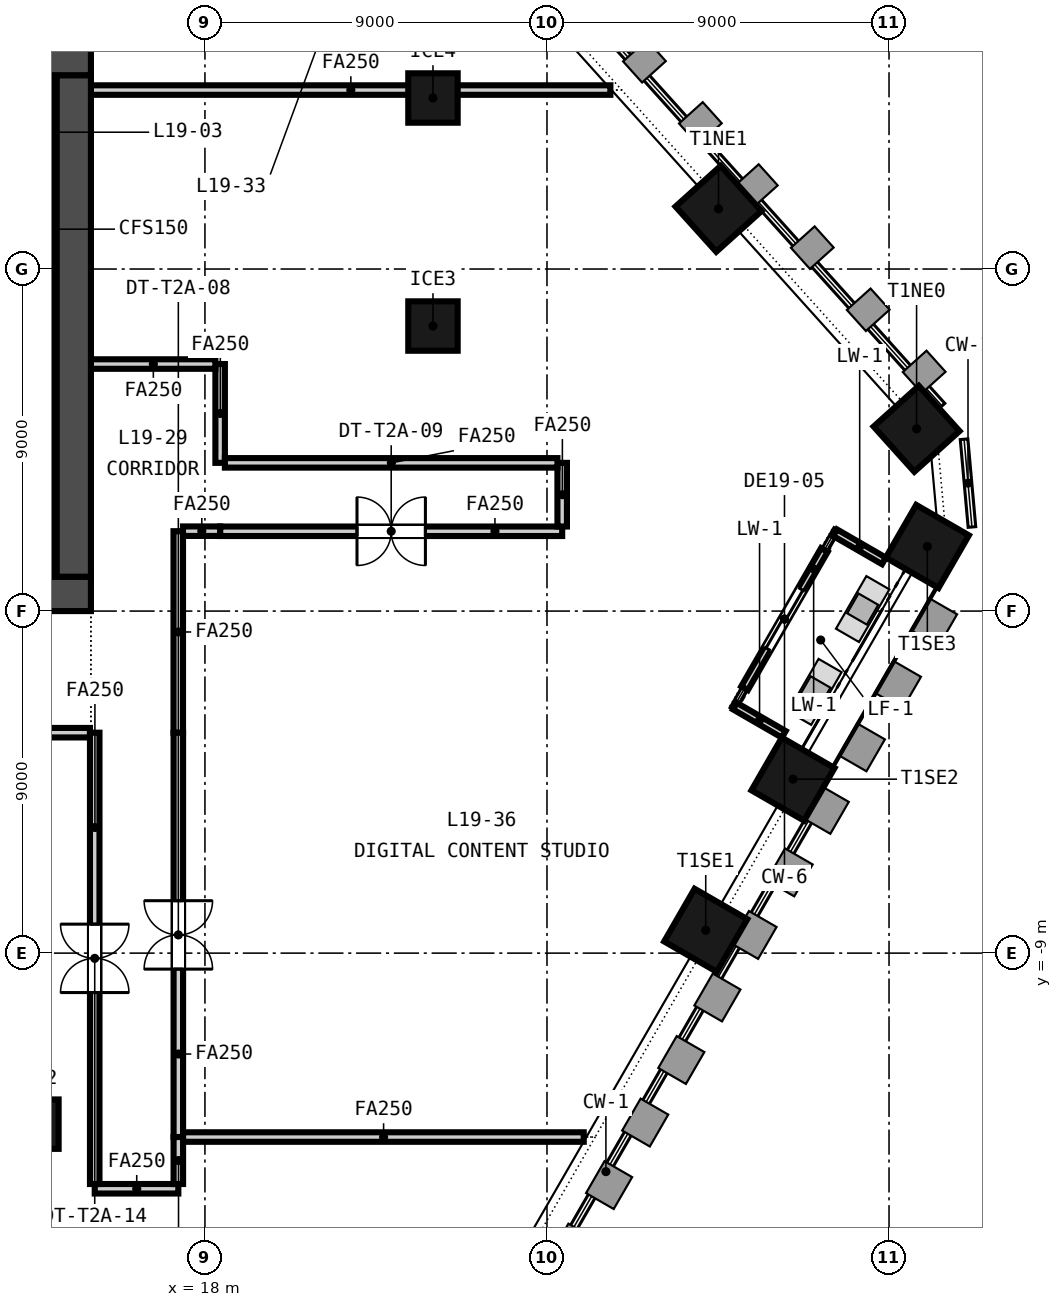
"""IFC4 building model, lengths in metres.
Left out: names, types, materials, properties, quantities, classifications, styles, units other than length and angle.
Written with IfcOpenShell. Run it as: python <this file> out.ifc"""

import sys

from ifc_helpers import new_model, si_unit, direction, frame, frame_2d, origin, origin_2d, place, context, subcontext, project, spatial, rectangle, extrude, element, fill, save


model = new_model("IFC4")
c1 = context("Model", 3, precision=1e-05, world=origin(), true_north=direction((0.0, 1.0)))
c2 = subcontext(c1, "Body", "Model", "MODEL_VIEW")
j1 = project(units=[si_unit("LENGTHUNIT", "METRE"), si_unit("PLANEANGLEUNIT", "RADIAN")], contexts=[c1])
p1 = place(None, origin())
s1 = spatial("IfcSite", under=j1, at=p1, CompositionType="ELEMENT")
p2 = place(p1, origin())
s2 = spatial("IfcBuilding", under=s1, at=p2, CompositionType="ELEMENT")
p3 = place(p2, frame((0.0, 0.0, 84.3)))
s3 = spatial("IfcBuildingStorey", under=s2, at=p3, CompositionType="ELEMENT", Elevation=84.3)
p4 = place(p3, frame((-15.0, 0.45, -0.15), z_axis=(0.0, 0.0, 1.0), x_axis=(1.0, 0.0, 0.0)))
e1 = element("IfcWall", 1, at=p4, inside=s3, PredefinedType="SOLIDWALL", context=c2, shape_type="SweptSolid", body=[
    extrude(rectangle(XDim=30.0, YDim=0.9, at=frame_2d((15.0, 0.0))), origin(), (0.0, 0.0, 1.0), 3.65),
])
p5 = place(p4, frame((5.8, 0.0, 0.15)))
e2 = element("IfcOpeningElement", 2, at=p5, cuts=e1, PredefinedType="OPENING", context=c2, shape_type="SweptSolid", body=[
    extrude(rectangle(XDim=2.4, YDim=2.4, at=frame_2d((1.2, 1.2))), frame((0.0, 0.46, 0.0), z_axis=(0.0, -1.0, 0.0), x_axis=(1.0, 0.0, 0.0)), (0.0, 0.0, 1.0), 0.92),
])
p6 = place(p4, frame((13.8, 0.0, 0.15)))
e3 = element("IfcOpeningElement", 3, at=p6, cuts=e1, PredefinedType="OPENING", context=c2, shape_type="SweptSolid", body=[
    extrude(rectangle(XDim=2.4, YDim=2.4, at=frame_2d((1.2, 1.2))), frame((0.0, 0.46, 0.0), z_axis=(0.0, -1.0, 0.0), x_axis=(1.0, 0.0, 0.0)), (0.0, 0.0, 1.0), 0.92),
])
p7 = place(p4, frame((21.8, 0.0, 0.15)))
e4 = element("IfcOpeningElement", 4, at=p7, cuts=e1, PredefinedType="OPENING", context=c2, shape_type="SweptSolid", body=[
    extrude(rectangle(XDim=2.4, YDim=2.4, at=frame_2d((1.2, 1.2))), frame((0.0, 0.46, 0.0), z_axis=(0.0, -1.0, 0.0), x_axis=(1.0, 0.0, 0.0)), (0.0, 0.0, 1.0), 0.92),
])
p8 = place(p4, frame((1.5, 0.0, 0.15)))
e5 = element("IfcOpeningElement", 5, at=p8, cuts=e1, PredefinedType="OPENING", context=c2, shape_type="SweptSolid", body=[
    extrude(rectangle(XDim=1.2, YDim=2.1, at=frame_2d((0.6, 1.05))), frame((0.0, 0.46, 0.0), z_axis=(0.0, -1.0, 0.0), x_axis=(1.0, 0.0, 0.0)), (0.0, 0.0, 1.0), 0.92),
])
p9 = place(p4, frame((27.3, 0.0, 0.15)))
e6 = element("IfcOpeningElement", 6, at=p9, cuts=e1, PredefinedType="OPENING", context=c2, shape_type="SweptSolid", body=[
    extrude(rectangle(XDim=1.2, YDim=2.1, at=frame_2d((0.6, 1.05))), frame((0.0, 0.46, 0.0), z_axis=(0.0, -1.0, 0.0), x_axis=(1.0, 0.0, 0.0)), (0.0, 0.0, 1.0), 0.92),
])
p10 = place(p3, frame((-15.0, 14.55, -0.15), z_axis=(0.0, 0.0, 1.0), x_axis=(1.0, 0.0, 0.0)))
e7 = element("IfcWall", 7, at=p10, inside=s3, PredefinedType="SOLIDWALL", context=c2, shape_type="SweptSolid", body=[
    extrude(rectangle(XDim=30.0, YDim=0.9, at=frame_2d((15.0, 0.0))), origin(), (0.0, 0.0, 1.0), 3.65),
])
p11 = place(p10, frame((9.25, 0.0, 0.15)))
e8 = element("IfcOpeningElement", 8, at=p11, cuts=e7, PredefinedType="OPENING", context=c2, shape_type="SweptSolid", body=[
    extrude(rectangle(XDim=1.5, YDim=2.1, at=frame_2d((0.75, 1.05))), frame((0.0, 0.46, 0.0), z_axis=(0.0, -1.0, 0.0), x_axis=(1.0, 0.0, 0.0)), (0.0, 0.0, 1.0), 0.92),
])
p12 = place(p10, frame((19.4, 0.0, 0.15)))
e9 = element("IfcOpeningElement", 9, at=p12, cuts=e7, PredefinedType="OPENING", context=c2, shape_type="SweptSolid", body=[
    extrude(rectangle(XDim=1.5, YDim=2.1, at=frame_2d((0.75, 1.05))), frame((0.0, 0.46, 0.0), z_axis=(0.0, -1.0, 0.0), x_axis=(1.0, 0.0, 0.0)), (0.0, 0.0, 1.0), 0.92),
])
p13 = place(p10, frame((1.5, 0.0, 0.15)))
e10 = element("IfcOpeningElement", 10, at=p13, cuts=e7, PredefinedType="OPENING", context=c2, shape_type="SweptSolid", body=[
    extrude(rectangle(XDim=1.2, YDim=2.1, at=frame_2d((0.6, 1.05))), frame((0.0, 0.46, 0.0), z_axis=(0.0, -1.0, 0.0), x_axis=(1.0, 0.0, 0.0)), (0.0, 0.0, 1.0), 0.92),
])
p14 = place(p10, frame((27.3, 0.0, 0.15)))
e11 = element("IfcOpeningElement", 11, at=p14, cuts=e7, PredefinedType="OPENING", context=c2, shape_type="SweptSolid", body=[
    extrude(rectangle(XDim=1.2, YDim=2.1, at=frame_2d((0.6, 1.05))), frame((0.0, 0.46, 0.0), z_axis=(0.0, -1.0, 0.0), x_axis=(1.0, 0.0, 0.0)), (0.0, 0.0, 1.0), 0.92),
])
p15 = place(p3, frame((14.55, 0.9, -0.15), z_axis=(0.0, 0.0, 1.0), x_axis=(0.0, 1.0, 0.0)))
e12 = element("IfcWall", 12, at=p15, inside=s3, PredefinedType="SOLIDWALL", context=c2, shape_type="SweptSolid", body=[
    extrude(rectangle(XDim=13.2, YDim=0.9, at=frame_2d((6.6, 0.0))), origin(), (0.0, 0.0, 1.0), 3.65),
])
for number, where, z_axis, x_axis in (
    (13, (31.177, -8.4, -0.15), (0.0, 0.0, 1.0), (0.5, 0.866, 0.0)),
    (14, (33.473, -4.422, -0.15), (0.0, 0.0, 1.0), (0.5, 0.866, 0.0)),
    (15, (37.008, 1.7, -0.15), (0.0, 0.0, 1.0), (0.5, 0.866, 0.0)),
    (16, (36.725, 4.795, -0.15), (0.0, 0.0, 1.0), (-0.669, 0.743, 0.0)),
    (17, (31.513, 10.584, -0.15), (0.0, 0.0, 1.0), (-0.669, 0.743, 0.0)),
):
    element("IfcColumn", number, at=place(p3, frame(where, z_axis=z_axis, x_axis=x_axis)), inside=s3, PredefinedType="COLUMN", context=c2, shape_type="SweptSolid", body=[
        extrude(rectangle(XDim=1.6, YDim=1.6, at=origin_2d()), origin(), (0.0, 0.0, 1.0), 3.65),
    ])
for number, where, z_axis, x_axis in (
    (18, (13.5, -13.5, -0.15), (0.0, 0.0, 1.0), (1.0, 0.0, 0.0)),
    (19, (24.0, 7.5, -0.15), (0.0, 0.0, 1.0), (1.0, 0.0, 0.0)),
    (20, (24.0, 13.5, -0.15), (0.0, 0.0, 1.0), (1.0, 0.0, 0.0)),
):
    element("IfcColumn", number, at=place(p3, frame(where, z_axis=z_axis, x_axis=x_axis)), inside=s3, PredefinedType="COLUMN", context=c2, shape_type="SweptSolid", body=[
        extrude(rectangle(XDim=1.3, YDim=1.3, at=origin_2d()), origin(), (0.0, 0.0, 1.0), 3.65),
    ])
p16 = place(p3, frame((32.199, -2.03, 0.0), z_axis=(0.0, 0.0, 1.0), x_axis=(0.499958946799, 0.866049104564, 0.0)))
e21 = element("IfcWall", 21, at=p16, inside=s3, PredefinedType="SOLIDWALL", context=c2, shape_type="SweptSolid", body=[
    extrude(rectangle(XDim=4.2, YDim=0.2, at=frame_2d((2.1, 0.0))), origin(), (0.0, 0.0, 1.0), 2.821),
])
p17 = place(p16, frame((1.2, 0.0, 0.0)))
e22 = element("IfcOpeningElement", 22, at=p17, cuts=e21, PredefinedType="OPENING", context=c2, shape_type="SweptSolid", body=[
    extrude(rectangle(XDim=1.8, YDim=2.4, at=frame_2d((0.9, 1.2))), frame((0.0, 0.11, 0.0), z_axis=(0.0, -1.0, 0.0), x_axis=(1.0, 0.0, 0.0)), (0.0, 0.0, 1.0), 0.22),
])
for number, where, z_axis, x_axis in (
    (23, (33.23, -3.243, 0.0), (0.0, 0.0, 1.0), (-0.866, 0.5, 0.0)),
    (24, (35.865, 1.321, 0.0), (0.0, 0.0, 1.0), (-0.866, 0.5, 0.0)),
):
    element("IfcWall", number, at=place(p3, frame(where, z_axis=z_axis, x_axis=x_axis)), inside=s3, PredefinedType="SOLIDWALL", context=c2, shape_type="SweptSolid", body=[
        extrude(rectangle(XDim=1.484, YDim=0.2, at=frame_2d((0.742, 0.0))), origin(), (0.0, 0.0, 1.0), 3.05),
    ])
p18 = place(p3, frame((11.05, 7.35, 0.0), z_axis=(0.0, 0.0, 1.0), x_axis=(1.0, 0.0, 0.0)))
e25 = element("IfcWall", 25, at=p18, inside=s3, PredefinedType="SOLIDWALL", context=c2, shape_type="SweptSolid", body=[
    extrude(rectangle(XDim=2.95, YDim=0.3, at=frame_2d((1.475, 0.0))), origin(), (0.0, 0.0, 1.0), 3.5),
])
p19 = place(p3, frame((14.05, 0.9, 0.0), z_axis=(0.0, 0.0, 1.0), x_axis=(0.0, 1.0, 0.0)))
e26 = element("IfcWall", 26, at=p19, inside=s3, PredefinedType="SOLIDWALL", context=c2, shape_type="SweptSolid", body=[
    extrude(rectangle(XDim=13.2, YDim=0.1, at=frame_2d((6.6, 0.0))), origin(), (0.0, 0.0, 1.0), 3.5),
])
p20 = place(p3, frame((14.975, -3.2, 0.0), z_axis=(0.0, 0.0, 1.0), x_axis=(-1.0, 0.0, 0.0)))
e27 = element("IfcWall", 27, at=p20, inside=s3, PredefinedType="PARTITIONING", context=c2, shape_type="SweptSolid", body=[
    extrude(rectangle(XDim=4.762, YDim=0.25, at=frame_2d((2.381, 0.0))), origin(), (0.0, 0.0, 1.0), 2.741),
])
p21 = place(p20, frame((1.469, 0.0, 0.0)))
e28 = element("IfcOpeningElement", 28, at=p21, cuts=e27, PredefinedType="OPENING", context=c2, shape_type="SweptSolid", body=[
    extrude(rectangle(XDim=1.8, YDim=2.1, at=frame_2d((0.9, 1.05))), frame((0.0, 0.135, 0.0), z_axis=(0.0, -1.0, 0.0), x_axis=(1.0, 0.0, 0.0)), (0.0, 0.0, 1.0), 0.27),
])
p22 = place(p3, frame((17.298, 2.102, 0.0), z_axis=(0.0, 0.0, 1.0), x_axis=(0.0, -1.0, 0.0)))
e29 = element("IfcWall", 29, at=p22, inside=s3, PredefinedType="PARTITIONING", context=c2, shape_type="SweptSolid", body=[
    extrude(rectangle(XDim=5.304, YDim=0.25, at=frame_2d((2.652, 0.0))), origin(), (0.0, 0.0, 1.0), 2.741),
])
p23 = place(p3, frame((18.402, 2.102, 0.0), z_axis=(0.0, 0.0, 1.0), x_axis=(-1.0, 0.0, 0.0)))
e30 = element("IfcWall", 30, at=p23, inside=s3, PredefinedType="PARTITIONING", context=c2, shape_type="SweptSolid", body=[
    extrude(rectangle(XDim=0.979, YDim=0.25, at=frame_2d((0.49, 0.0))), origin(), (0.0, 0.0, 1.0), 2.741),
])
p24 = place(p3, frame((17.3, -3.202, 0.0), z_axis=(0.0, 0.0, 1.0), x_axis=(0.0, -1.0, 0.0)))
e31 = element("IfcWall", 31, at=p24, inside=s3, PredefinedType="PARTITIONING", context=c2, shape_type="SweptSolid", body=[
    extrude(rectangle(XDim=10.637, YDim=0.25, at=frame_2d((5.319, 0.0))), origin(), (0.0, 0.0, 1.0), 2.741),
])
p25 = place(p24, frame((4.418, 0.0, 0.0)))
e32 = element("IfcOpeningElement", 32, at=p25, cuts=e31, PredefinedType="OPENING", context=c2, shape_type="SweptSolid", body=[
    extrude(rectangle(XDim=1.8, YDim=2.1, at=frame_2d((0.9, 1.05))), frame((0.0, 0.135, 0.0), z_axis=(0.0, -1.0, 0.0), x_axis=(1.0, 0.0, 0.0)), (0.0, 0.0, 1.0), 0.27),
])
p26 = place(p3, frame((18.4, 6.5, 0.0), z_axis=(0.0, 0.0, 1.0), x_axis=(0.0, -1.0, 0.0)))
e33 = element("IfcWall", 33, at=p26, inside=s3, PredefinedType="PARTITIONING", context=c2, shape_type="SweptSolid", body=[
    extrude(rectangle(XDim=2.6, YDim=0.25, at=frame_2d((1.3, 0.0))), origin(), (0.0, 0.0, 1.0), 2.741),
])
p27 = place(p3, frame((27.4, 2.1, 0.0), z_axis=(0.0, 0.0, 1.0), x_axis=(-1.0, 0.0, 0.0)))
e34 = element("IfcWall", 34, at=p27, inside=s3, PredefinedType="PARTITIONING", context=c2, shape_type="SweptSolid", body=[
    extrude(rectangle(XDim=8.998, YDim=0.25, at=frame_2d((4.499, 0.0))), origin(), (0.0, 0.0, 1.0), 2.741),
])
p28 = place(p27, frame((3.599, 0.0, 0.0)))
e35 = element("IfcOpeningElement", 35, at=p28, cuts=e34, PredefinedType="OPENING", context=c2, shape_type="SweptSolid", body=[
    extrude(rectangle(XDim=1.8, YDim=2.1, at=frame_2d((0.9, 1.05))), frame((0.0, 0.135, 0.0), z_axis=(0.0, -1.0, 0.0), x_axis=(1.0, 0.0, 0.0)), (0.0, 0.0, 1.0), 0.27),
])
p29 = place(p3, frame((27.4, 3.9, 0.0), z_axis=(0.0, 0.0, 1.0), x_axis=(0.0, -1.0, 0.0)))
e36 = element("IfcWall", 36, at=p29, inside=s3, PredefinedType="PARTITIONING", context=c2, shape_type="SweptSolid", body=[
    extrude(rectangle(XDim=1.675, YDim=0.25, at=frame_2d((0.837, 0.0))), origin(), (0.0, 0.0, 1.0), 2.741),
])
p30 = place(p3, frame((17.3, -15.2, 0.0), z_axis=(0.0, 0.0, 1.0), x_axis=(-1.0, 0.0, 0.0)))
e37 = element("IfcWall", 37, at=p30, inside=s3, PredefinedType="PARTITIONING", context=c2, shape_type="SweptSolid", body=[
    extrude(rectangle(XDim=2.2, YDim=0.25, at=frame_2d((1.1, 0.0))), origin(), (0.0, 0.0, 1.0), 2.741),
])
p31 = place(p3, frame((17.3, -13.839, 0.0), z_axis=(0.0, 0.0, 1.0), x_axis=(0.0, -1.0, 0.0)))
e38 = element("IfcWall", 38, at=p31, inside=s3, PredefinedType="PARTITIONING", context=c2, shape_type="SweptSolid", body=[
    extrude(rectangle(XDim=1.236, YDim=0.25, at=frame_2d((0.618, 0.0))), origin(), (0.0, 0.0, 1.0), 2.741),
])
p32 = place(p3, frame((15.0, 13.709, 0.0), z_axis=(0.0, 0.0, 1.0), x_axis=(1.0, 0.0, 0.0)))
e39 = element("IfcWall", 39, at=p32, inside=s3, PredefinedType="PARTITIONING", context=c2, shape_type="SweptSolid", body=[
    extrude(rectangle(XDim=13.668, YDim=0.25, at=frame_2d((6.834, 0.0))), origin(), (0.0, 0.0, 1.0), 2.741),
])
p33 = place(p3, frame((15.0, 6.5, 0.0), z_axis=(0.0, 0.0, 1.0), x_axis=(1.0, 0.0, 0.0)))
e40 = element("IfcWall", 40, at=p33, inside=s3, PredefinedType="PARTITIONING", context=c2, shape_type="SweptSolid", body=[
    extrude(rectangle(XDim=3.275, YDim=0.25, at=frame_2d((1.637, 0.0))), origin(), (0.0, 0.0, 1.0), 2.741),
])
p34 = place(p3, frame((18.525, 3.9, 0.0), z_axis=(0.0, 0.0, 1.0), x_axis=(1.0, 0.0, 0.0)))
e41 = element("IfcWall", 41, at=p34, inside=s3, PredefinedType="PARTITIONING", context=c2, shape_type="SweptSolid", body=[
    extrude(rectangle(XDim=8.75, YDim=0.25, at=frame_2d((4.375, 0.0))), origin(), (0.0, 0.0, 1.0), 2.741),
])
p35 = place(p3, frame((17.425, -13.839, 0.0), z_axis=(0.0, 0.0, 1.0), x_axis=(1.0, 0.0, 0.0)))
e42 = element("IfcWall", 42, at=p35, inside=s3, PredefinedType="PARTITIONING", context=c2, shape_type="SweptSolid", body=[
    extrude(rectangle(XDim=10.542, YDim=0.25, at=frame_2d((5.271, 0.0))), origin(), (0.0, 0.0, 1.0), 2.741),
])
p36 = place(p3, frame((15.1, -15.075, 0.0), z_axis=(0.0, 0.0, 1.0), x_axis=(0.0, 1.0, 0.0)))
e43 = element("IfcWall", 43, at=p36, inside=s3, PredefinedType="PARTITIONING", context=c2, shape_type="SweptSolid", body=[
    extrude(rectangle(XDim=11.875, YDim=0.25, at=frame_2d((5.938, 0.0))), origin(), (0.0, 0.0, 1.0), 2.741),
])
p37 = place(p36, frame((5.038, 0.0, 0.0)))
e44 = element("IfcOpeningElement", 44, at=p37, cuts=e43, PredefinedType="OPENING", context=c2, shape_type="SweptSolid", body=[
    extrude(rectangle(XDim=1.8, YDim=2.1, at=frame_2d((0.9, 1.05))), frame((0.0, 0.135, 0.0), z_axis=(0.0, -1.0, 0.0), x_axis=(1.0, 0.0, 0.0)), (0.0, 0.0, 1.0), 0.27),
])
p38 = place(p17, origin())
e45 = element("IfcDoor", 45, at=p38, inside=s3, OperationType="SINGLE_SWING_LEFT", PredefinedType="DOOR", context=c2, shape_type="SweptSolid", body=[
    extrude(rectangle(XDim=1.8, YDim=2.4, at=frame_2d((0.9, 1.2))), frame((0.0, 0.025, 0.0), z_axis=(0.0, -1.0, 0.0), x_axis=(1.0, 0.0, 0.0)), (0.0, 0.0, 1.0), 0.05),
])
fill(e22, e45)
p39 = place(p25, origin())
e46 = element("IfcDoor", 46, at=p39, inside=s3, OperationType="DOUBLE_DOOR_DOUBLE_SWING", PredefinedType="DOOR", context=c2, shape_type="SweptSolid", body=[
    extrude(rectangle(XDim=1.8, YDim=2.1, at=frame_2d((0.9, 1.05))), frame((0.0, 0.025, 0.0), z_axis=(0.0, -1.0, 0.0), x_axis=(1.0, 0.0, 0.0)), (0.0, 0.0, 1.0), 0.05),
])
fill(e32, e46)
p40 = place(p28, origin())
e47 = element("IfcDoor", 47, at=p40, inside=s3, OperationType="DOUBLE_DOOR_DOUBLE_SWING", PredefinedType="DOOR", context=c2, shape_type="SweptSolid", body=[
    extrude(rectangle(XDim=1.8, YDim=2.1, at=frame_2d((0.9, 1.05))), frame((0.0, 0.025, 0.0), z_axis=(0.0, -1.0, 0.0), x_axis=(1.0, 0.0, 0.0)), (0.0, 0.0, 1.0), 0.05),
])
fill(e35, e47)
p41 = place(p37, origin())
e48 = element("IfcDoor", 48, at=p41, inside=s3, OperationType="DOUBLE_DOOR_DOUBLE_SWING", PredefinedType="DOOR", context=c2, shape_type="SweptSolid", body=[
    extrude(rectangle(XDim=1.8, YDim=2.1, at=frame_2d((0.9, 1.05))), frame((0.0, 0.025, 0.0), z_axis=(0.0, -1.0, 0.0), x_axis=(1.0, 0.0, 0.0)), (0.0, 0.0, 1.0), 0.05),
])
fill(e44, e48)
save(model, sys.argv[1])
